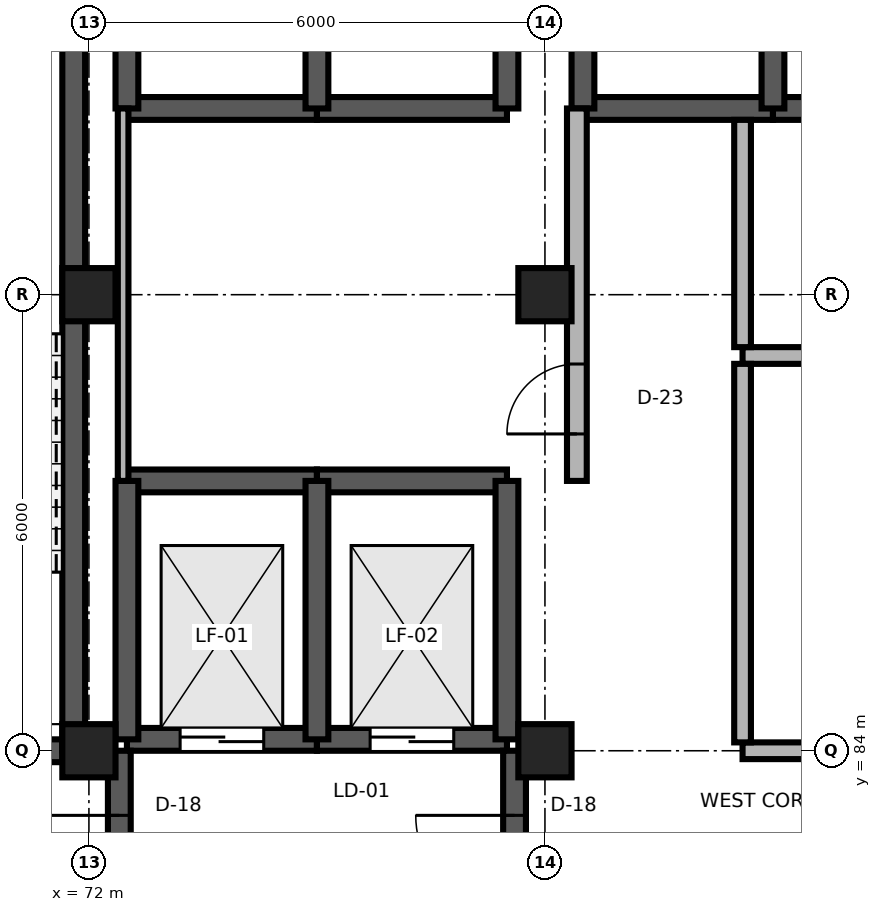
"""IFC4 building model, lengths in metres.
Left out: names, types, materials, properties, quantities, classifications, styles, units other than length and angle.
Written with IfcOpenShell. Run it as: python <this file> out.ifc"""

import sys

from ifc_helpers import new_model, si_unit, direction, frame, frame_2d, origin, origin_2d, place, context, subcontext, project, spatial, rectangle, extrude, element, fill, save


model = new_model("IFC4")
c1 = context("Model", 3, precision=1e-05, world=origin(), true_north=direction((0.0, 1.0)))
c2 = subcontext(c1, "Body", "Model", "MODEL_VIEW")
j1 = project(units=[si_unit("LENGTHUNIT", "METRE"), si_unit("PLANEANGLEUNIT", "RADIAN")], contexts=[c1])
p1 = place(None, origin())
s1 = spatial("IfcSite", under=j1, at=p1, CompositionType="ELEMENT")
p2 = place(p1, origin())
s2 = spatial("IfcBuilding", under=s1, at=p2, CompositionType="ELEMENT")
p3 = place(p2, frame((0.0, 0.0, 60.0)))
s3 = spatial("IfcBuildingStorey", under=s2, at=p3, CompositionType="ELEMENT", Elevation=60.0)
for number, where, z_axis, x_axis in (
    (1, (72.0, 84.0, 0.0), (0.0, 0.0, 1.0), (1.0, 0.0, 0.0)),
    (2, (78.0, 84.0, 0.0), (0.0, 0.0, 1.0), (1.0, 0.0, 0.0)),
    (3, (72.0, 90.0, 0.0), (0.0, 0.0, 1.0), (1.0, 0.0, 0.0)),
    (4, (78.0, 90.0, 0.0), (0.0, 0.0, 1.0), (1.0, 0.0, 0.0)),
):
    element("IfcColumn", number, at=place(p3, frame(where, z_axis=z_axis, x_axis=x_axis)), inside=s3, PredefinedType="COLUMN", context=c2, shape_type="SweptSolid", body=[
        extrude(rectangle(XDim=0.7, YDim=0.7, at=origin_2d()), origin(), (0.0, 0.0, 1.0), 3.9),
    ])
p4 = place(p3, frame((66.35, 84.0, 0.0), z_axis=(0.0, 0.0, 1.0), x_axis=(1.0, 0.0, 0.0)))
e5 = element("IfcWall", 5, at=p4, inside=s3, PredefinedType="SHEAR", context=c2, shape_type="SweptSolid", body=[
    extrude(rectangle(XDim=5.3, YDim=0.3, at=frame_2d((2.65, 0.0))), origin(), (0.0, 0.0, 1.0), 3.66),
])
p5 = place(p4, frame((1.975, 0.0, 0.0)))
e6 = element("IfcOpeningElement", 6, at=p5, cuts=e5, PredefinedType="OPENING", context=c2, shape_type="SweptSolid", body=[
    extrude(rectangle(XDim=1.35, YDim=2.2, at=frame_2d((0.675, 1.1))), frame((0.0, 0.165, 0.0), z_axis=(0.0, -1.0, 0.0), x_axis=(1.0, 0.0, 0.0)), (0.0, 0.0, 1.0), 0.33),
])
p6 = place(p3, frame((71.8, 84.0, 0.0), z_axis=(0.0, 0.0, 1.0), x_axis=(0.0, 1.0, 0.0)))
e7 = element("IfcWall", 7, at=p6, inside=s3, PredefinedType="SHEAR", context=c2, shape_type="SweptSolid", body=[
    extrude(rectangle(XDim=11.8, YDim=0.3, at=frame_2d((5.9, 0.0))), origin(), (0.0, 0.0, 1.0), 3.74),
])
p7 = place(p3, frame((72.5, 84.15, 0.0), z_axis=(0.0, 0.0, 1.0), x_axis=(1.0, 0.0, 0.0)))
e8 = element("IfcWall", 8, at=p7, inside=s3, PredefinedType="SHEAR", context=c2, shape_type="SweptSolid", body=[
    extrude(rectangle(XDim=2.5, YDim=0.3, at=frame_2d((1.25, 0.0))), origin(), (0.0, 0.0, 1.0), 3.74),
])
p8 = place(p7, frame((0.7, 0.0, 0.0)))
e9 = element("IfcOpeningElement", 9, at=p8, cuts=e8, PredefinedType="OPENING", context=c2, shape_type="SweptSolid", body=[
    extrude(rectangle(XDim=1.1, YDim=2.1, at=frame_2d((0.55, 1.05))), frame((0.0, 0.165, 0.0), z_axis=(0.0, -1.0, 0.0), x_axis=(1.0, 0.0, 0.0)), (0.0, 0.0, 1.0), 0.33),
])
p9 = place(p3, frame((72.5, 87.55, 0.0), z_axis=(0.0, 0.0, 1.0), x_axis=(1.0, 0.0, 0.0)))
e10 = element("IfcWall", 10, at=p9, inside=s3, PredefinedType="SHEAR", context=c2, shape_type="SweptSolid", body=[
    extrude(rectangle(XDim=2.5, YDim=0.3, at=frame_2d((1.25, 0.0))), origin(), (0.0, 0.0, 1.0), 3.74),
])
p10 = place(p3, frame((72.5, 84.15, 0.0), z_axis=(0.0, 0.0, 1.0), x_axis=(0.0, 1.0, 0.0)))
e11 = element("IfcWall", 11, at=p10, inside=s3, PredefinedType="SHEAR", context=c2, shape_type="SweptSolid", body=[
    extrude(rectangle(XDim=3.4, YDim=0.3, at=frame_2d((1.7, 0.0))), origin(), (0.0, 0.0, 1.0), 3.74),
])
p11 = place(p3, frame((75.0, 84.15, 0.0), z_axis=(0.0, 0.0, 1.0), x_axis=(1.0, 0.0, 0.0)))
e12 = element("IfcWall", 12, at=p11, inside=s3, PredefinedType="SHEAR", context=c2, shape_type="SweptSolid", body=[
    extrude(rectangle(XDim=2.5, YDim=0.3, at=frame_2d((1.25, 0.0))), origin(), (0.0, 0.0, 1.0), 3.74),
])
p12 = place(p11, frame((0.7, 0.0, 0.0)))
e13 = element("IfcOpeningElement", 13, at=p12, cuts=e12, PredefinedType="OPENING", context=c2, shape_type="SweptSolid", body=[
    extrude(rectangle(XDim=1.1, YDim=2.1, at=frame_2d((0.55, 1.05))), frame((0.0, 0.165, 0.0), z_axis=(0.0, -1.0, 0.0), x_axis=(1.0, 0.0, 0.0)), (0.0, 0.0, 1.0), 0.33),
])
p13 = place(p3, frame((75.0, 87.55, 0.0), z_axis=(0.0, 0.0, 1.0), x_axis=(1.0, 0.0, 0.0)))
e14 = element("IfcWall", 14, at=p13, inside=s3, PredefinedType="SHEAR", context=c2, shape_type="SweptSolid", body=[
    extrude(rectangle(XDim=2.5, YDim=0.3, at=frame_2d((1.25, 0.0))), origin(), (0.0, 0.0, 1.0), 3.74),
])
for number, where, z_axis, x_axis in (
    (15, (75.0, 84.15, 0.0), (0.0, 0.0, 1.0), (0.0, 1.0, 0.0)),
    (16, (77.5, 84.15, 0.0), (0.0, 0.0, 1.0), (0.0, 1.0, 0.0)),
):
    element("IfcWall", number, at=place(p3, frame(where, z_axis=z_axis, x_axis=x_axis)), inside=s3, PredefinedType="SHEAR", context=c2, shape_type="SweptSolid", body=[
        extrude(rectangle(XDim=3.4, YDim=0.3, at=frame_2d((1.7, 0.0))), origin(), (0.0, 0.0, 1.0), 3.74),
    ])
p14 = place(p3, frame((72.5, 92.45, 0.0), z_axis=(0.0, 0.0, 1.0), x_axis=(1.0, 0.0, 0.0)))
e17 = element("IfcWall", 17, at=p14, inside=s3, PredefinedType="SHEAR", context=c2, shape_type="SweptSolid", body=[
    extrude(rectangle(XDim=2.5, YDim=0.3, at=frame_2d((1.25, 0.0))), origin(), (0.0, 0.0, 1.0), 3.74),
])
p15 = place(p3, frame((72.5, 92.45, 0.0), z_axis=(0.0, 0.0, 1.0), x_axis=(0.0, 1.0, 0.0)))
e18 = element("IfcWall", 18, at=p15, inside=s3, PredefinedType="SHEAR", context=c2, shape_type="SweptSolid", body=[
    extrude(rectangle(XDim=3.4, YDim=0.3, at=frame_2d((1.7, 0.0))), origin(), (0.0, 0.0, 1.0), 3.74),
])
p16 = place(p3, frame((75.0, 92.45, 0.0), z_axis=(0.0, 0.0, 1.0), x_axis=(1.0, 0.0, 0.0)))
e19 = element("IfcWall", 19, at=p16, inside=s3, PredefinedType="SHEAR", context=c2, shape_type="SweptSolid", body=[
    extrude(rectangle(XDim=2.5, YDim=0.3, at=frame_2d((1.25, 0.0))), origin(), (0.0, 0.0, 1.0), 3.74),
])
for number, where, z_axis, x_axis in (
    (20, (75.0, 92.45, 0.0), (0.0, 0.0, 1.0), (0.0, 1.0, 0.0)),
    (21, (77.5, 92.45, 0.0), (0.0, 0.0, 1.0), (0.0, 1.0, 0.0)),
):
    element("IfcWall", number, at=place(p3, frame(where, z_axis=z_axis, x_axis=x_axis)), inside=s3, PredefinedType="SHEAR", context=c2, shape_type="SweptSolid", body=[
        extrude(rectangle(XDim=3.4, YDim=0.3, at=frame_2d((1.7, 0.0))), origin(), (0.0, 0.0, 1.0), 3.74),
    ])
p17 = place(p3, frame((78.5, 92.45, 0.0), z_axis=(0.0, 0.0, 1.0), x_axis=(1.0, 0.0, 0.0)))
e22 = element("IfcWall", 22, at=p17, inside=s3, PredefinedType="SHEAR", context=c2, shape_type="SweptSolid", body=[
    extrude(rectangle(XDim=2.5, YDim=0.3, at=frame_2d((1.25, 0.0))), origin(), (0.0, 0.0, 1.0), 3.74),
])
p18 = place(p3, frame((78.5, 92.45, 0.0), z_axis=(0.0, 0.0, 1.0), x_axis=(0.0, 1.0, 0.0)))
e23 = element("IfcWall", 23, at=p18, inside=s3, PredefinedType="SHEAR", context=c2, shape_type="SweptSolid", body=[
    extrude(rectangle(XDim=3.4, YDim=0.3, at=frame_2d((1.7, 0.0))), origin(), (0.0, 0.0, 1.0), 3.74),
])
p19 = place(p3, frame((81.0, 92.45, 0.0), z_axis=(0.0, 0.0, 1.0), x_axis=(1.0, 0.0, 0.0)))
e24 = element("IfcWall", 24, at=p19, inside=s3, PredefinedType="SHEAR", context=c2, shape_type="SweptSolid", body=[
    extrude(rectangle(XDim=2.5, YDim=0.3, at=frame_2d((1.25, 0.0))), origin(), (0.0, 0.0, 1.0), 3.74),
])
p20 = place(p3, frame((81.0, 92.45, 0.0), z_axis=(0.0, 0.0, 1.0), x_axis=(0.0, 1.0, 0.0)))
e25 = element("IfcWall", 25, at=p20, inside=s3, PredefinedType="SHEAR", context=c2, shape_type="SweptSolid", body=[
    extrude(rectangle(XDim=3.4, YDim=0.3, at=frame_2d((1.7, 0.0))), origin(), (0.0, 0.0, 1.0), 3.74),
])
p21 = place(p3, frame((72.4, 81.0, 0.0), z_axis=(0.0, 0.0, 1.0), x_axis=(0.0, 1.0, 0.0)))
e26 = element("IfcWall", 26, at=p21, inside=s3, PredefinedType="SHEAR", context=c2, shape_type="SweptSolid", body=[
    extrude(rectangle(XDim=3.0, YDim=0.3, at=frame_2d((1.5, 0.0))), origin(), (0.0, 0.0, 1.0), 3.74),
])
p22 = place(p21, frame((0.85, 0.0, 0.0)))
e27 = element("IfcOpeningElement", 27, at=p22, cuts=e26, PredefinedType="OPENING", context=c2, shape_type="SweptSolid", body=[
    extrude(rectangle(XDim=1.3, YDim=2.2, at=frame_2d((0.65, 1.1))), frame((0.0, 0.165, 0.0), z_axis=(0.0, -1.0, 0.0), x_axis=(1.0, 0.0, 0.0)), (0.0, 0.0, 1.0), 0.33),
])
p23 = place(p3, frame((77.6, 81.0, 0.0), z_axis=(0.0, 0.0, 1.0), x_axis=(0.0, 1.0, 0.0)))
e28 = element("IfcWall", 28, at=p23, inside=s3, PredefinedType="SHEAR", context=c2, shape_type="SweptSolid", body=[
    extrude(rectangle(XDim=3.0, YDim=0.3, at=frame_2d((1.5, 0.0))), origin(), (0.0, 0.0, 1.0), 3.74),
])
p24 = place(p23, frame((0.85, 0.0, 0.0)))
e29 = element("IfcOpeningElement", 29, at=p24, cuts=e28, PredefinedType="OPENING", context=c2, shape_type="SweptSolid", body=[
    extrude(rectangle(XDim=1.3, YDim=2.2, at=frame_2d((0.65, 1.1))), frame((0.0, 0.165, 0.0), z_axis=(0.0, -1.0, 0.0), x_axis=(1.0, 0.0, 0.0)), (0.0, 0.0, 1.0), 0.33),
])
p25 = place(p3, frame((80.6, 84.0, 0.0), z_axis=(0.0, 0.0, 1.0), x_axis=(1.0, 0.0, 0.0)))
e30 = element("IfcWall", 30, at=p25, inside=s3, PredefinedType="PARTITIONING", context=c2, shape_type="SweptSolid", body=[
    extrude(rectangle(XDim=3.7, YDim=0.22, at=frame_2d((1.85, 0.0))), origin(), (0.0, 0.0, 1.0), 3.449),
])
p26 = place(p25, frame((1.375, 0.0, 0.0)))
e31 = element("IfcOpeningElement", 31, at=p26, cuts=e30, PredefinedType="OPENING", context=c2, shape_type="SweptSolid", body=[
    extrude(rectangle(XDim=0.95, YDim=2.15, at=frame_2d((0.475, 1.075))), frame((0.0, 0.125, 0.0), z_axis=(0.0, -1.0, 0.0), x_axis=(1.0, 0.0, 0.0)), (0.0, 0.0, 1.0), 0.25),
])
p27 = place(p3, frame((80.6, 89.2, 0.0), z_axis=(0.0, 0.0, 1.0), x_axis=(1.0, 0.0, 0.0)))
e32 = element("IfcWall", 32, at=p27, inside=s3, PredefinedType="PARTITIONING", context=c2, shape_type="SweptSolid", body=[
    extrude(rectangle(XDim=9.87, YDim=0.22, at=frame_2d((4.935, 0.0))), origin(), (0.0, 0.0, 1.0), 3.74),
])
p28 = place(p3, frame((78.42, 87.55, 0.0), z_axis=(0.0, 0.0, 1.0), x_axis=(0.0, 1.0, 0.0)))
e33 = element("IfcWall", 33, at=p28, inside=s3, PredefinedType="PARTITIONING", context=c2, shape_type="SweptSolid", body=[
    extrude(rectangle(XDim=4.9, YDim=0.26, at=frame_2d((2.45, 0.0))), origin(), (0.0, 0.0, 1.0), 3.74),
])
p29 = place(p28, frame((0.618, 0.0, 0.0)))
e34 = element("IfcOpeningElement", 34, at=p29, cuts=e33, PredefinedType="OPENING", context=c2, shape_type="SweptSolid", body=[
    extrude(rectangle(XDim=0.92, YDim=2.15, at=frame_2d((0.46, 1.075))), frame((0.0, 0.145, 0.0), z_axis=(0.0, -1.0, 0.0), x_axis=(1.0, 0.0, 0.0)), (0.0, 0.0, 1.0), 0.29),
])
p30 = place(p3, frame((72.45, 87.55, 0.0), z_axis=(0.0, 0.0, 1.0), x_axis=(0.0, 1.0, 0.0)))
e35 = element("IfcWall", 35, at=p30, inside=s3, PredefinedType="PARTITIONING", context=c2, shape_type="SweptSolid", body=[
    extrude(rectangle(XDim=4.9, YDim=0.14, at=frame_2d((2.45, 0.0))), origin(), (0.0, 0.0, 1.0), 3.74),
])
p31 = place(p3, frame((80.6, 84.11, 0.0), z_axis=(0.0, 0.0, 1.0), x_axis=(0.0, 1.0, 0.0)))
e36 = element("IfcWall", 36, at=p31, inside=s3, PredefinedType="PARTITIONING", context=c2, shape_type="SweptSolid", body=[
    extrude(rectangle(XDim=4.98, YDim=0.22, at=frame_2d((2.49, 0.0))), origin(), (0.0, 0.0, 1.0), 3.74),
])
p32 = place(p3, frame((80.6, 89.31, 0.0), z_axis=(0.0, 0.0, 1.0), x_axis=(0.0, 1.0, 0.0)))
e37 = element("IfcWall", 37, at=p32, inside=s3, PredefinedType="PARTITIONING", context=c2, shape_type="SweptSolid", body=[
    extrude(rectangle(XDim=2.99, YDim=0.22, at=frame_2d((1.495, 0.0))), origin(), (0.0, 0.0, 1.0), 3.74),
])
p33 = place(p8, origin())
e38 = element("IfcDoor", 38, at=p33, inside=s3, OperationType="DOUBLE_DOOR_SLIDING", PredefinedType="DOOR", context=c2, shape_type="SweptSolid", body=[
    extrude(rectangle(XDim=1.1, YDim=2.1, at=frame_2d((0.55, 1.05))), frame((0.0, 0.025, 0.0), z_axis=(0.0, -1.0, 0.0), x_axis=(1.0, 0.0, 0.0)), (0.0, 0.0, 1.0), 0.05),
])
fill(e9, e38)
p34 = place(p12, origin())
e39 = element("IfcDoor", 39, at=p34, inside=s3, OperationType="DOUBLE_DOOR_SLIDING", PredefinedType="DOOR", context=c2, shape_type="SweptSolid", body=[
    extrude(rectangle(XDim=1.1, YDim=2.1, at=frame_2d((0.55, 1.05))), frame((0.0, 0.025, 0.0), z_axis=(0.0, -1.0, 0.0), x_axis=(1.0, 0.0, 0.0)), (0.0, 0.0, 1.0), 0.05),
])
fill(e13, e39)
p35 = place(p22, origin())
e40 = element("IfcDoor", 40, at=p35, inside=s3, OperationType="SINGLE_SWING_RIGHT", PredefinedType="DOOR", context=c2, shape_type="SweptSolid", body=[
    extrude(rectangle(XDim=1.3, YDim=2.2, at=frame_2d((0.65, 1.1))), frame((0.0, 0.025, 0.0), z_axis=(0.0, -1.0, 0.0), x_axis=(1.0, 0.0, 0.0)), (0.0, 0.0, 1.0), 0.05),
])
fill(e27, e40)
p36 = place(p24, origin())
e41 = element("IfcDoor", 41, at=p36, inside=s3, OperationType="SINGLE_SWING_RIGHT", PredefinedType="DOOR", context=c2, shape_type="SweptSolid", body=[
    extrude(rectangle(XDim=1.3, YDim=2.2, at=frame_2d((0.65, 1.1))), frame((0.0, 0.025, 0.0), z_axis=(0.0, -1.0, 0.0), x_axis=(1.0, 0.0, 0.0)), (0.0, 0.0, 1.0), 0.05),
])
fill(e29, e41)
p37 = place(p29, origin())
e42 = element("IfcDoor", 42, at=p37, inside=s3, OperationType="SINGLE_SWING_LEFT", PredefinedType="DOOR", context=c2, shape_type="SweptSolid", body=[
    extrude(rectangle(XDim=0.92, YDim=2.15, at=frame_2d((0.46, 1.075))), frame((0.0, 0.025, 0.0), z_axis=(0.0, -1.0, 0.0), x_axis=(1.0, 0.0, 0.0)), (0.0, 0.0, 1.0), 0.05),
])
fill(e34, e42)
save(model, sys.argv[1])
